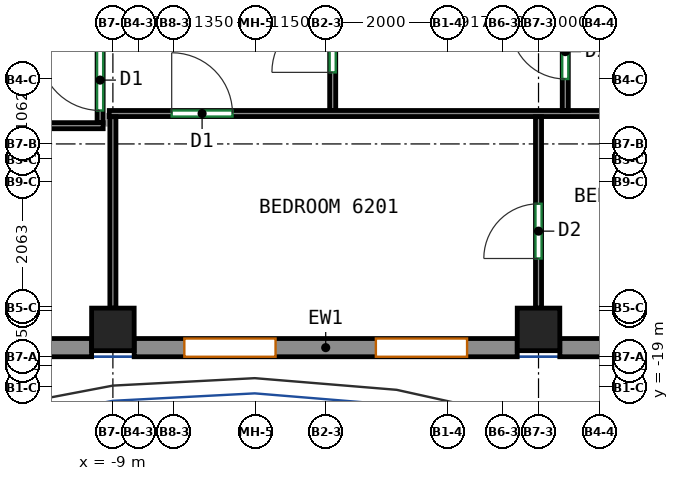
"""IFC4 building model, lengths in metres.
Left out: names, types, materials, properties, quantities, classifications, styles, units other than length and angle.
Written with IfcOpenShell. Run it as: python <this file> out.ifc"""

import sys

from ifc_helpers import new_model, si_unit, direction, frame, frame_2d, origin, origin_2d, place, context, subcontext, project, spatial, rectangle, extrude, source, transform, mapped, element, fill, save


model = new_model("IFC4")
c1 = context("Model", 3, precision=1e-05, world=origin(), true_north=direction((0.0, 1.0)))
c2 = subcontext(c1, "Body", "Model", "MODEL_VIEW")
j1 = project(units=[si_unit("LENGTHUNIT", "METRE"), si_unit("PLANEANGLEUNIT", "RADIAN")], contexts=[c1])
p1 = place(None, origin())
s1 = spatial("IfcSite", under=j1, at=p1, CompositionType="ELEMENT")
p2 = place(p1, origin())
s2 = spatial("IfcBuilding", under=s1, at=p2, CompositionType="ELEMENT")
p3 = place(p2, frame((0.0, 0.0, 256.0)))
s3 = spatial("IfcBuildingStorey", under=s2, at=p3, CompositionType="ELEMENT", Elevation=256.0)
m1 = source(origin(), c2, "Body", "SweptSolid", [
    extrude(rectangle(XDim=0.7, YDim=0.7, at=origin_2d()), origin(), (0.0, 0.0, 1.0), 3.12),
])
for number, where, z_axis, x_axis in (
    (1, (-9.0, -18.05, 0.0), (0.0, 0.0, 1.0), (1.0, 0.0, 0.0)),
    (2, (-2.0, -18.05, 0.0), (0.0, 0.0, 1.0), (1.0, 0.0, 0.0)),
):
    element("IfcColumn", number, at=place(p3, frame(where, z_axis=z_axis, x_axis=x_axis)), inside=s3, PredefinedType="COLUMN", context=c2, shape_type="MappedRepresentation", body=[
        mapped(m1, transform((0.0, 0.0, 0.0))),
    ])
m2 = source(origin(), c2, "Body", "SweptSolid", [
    extrude(rectangle(XDim=6.3, YDim=0.3, at=frame_2d((3.15, 0.0))), origin(), (0.0, 0.0, 1.0), 3.12),
])
p4 = place(p3, frame((-15.65, -18.35, 0.0), z_axis=(0.0, 0.0, 1.0), x_axis=(1.0, 0.0, 0.0)))
e3 = element("IfcWall", 3, at=p4, inside=s3, PredefinedType="SOLIDWALL", context=c2, shape_type="MappedRepresentation", body=[
    mapped(m2, transform((0.0, 0.0, 0.0))),
])
p5 = place(p4, frame((0.825, 0.0, 0.8)))
e4 = element("IfcOpeningElement", 4, at=p5, cuts=e3, PredefinedType="OPENING", context=c2, shape_type="SweptSolid", body=[
    extrude(rectangle(XDim=1.5, YDim=2.05, at=frame_2d((0.75, 1.025))), frame((0.0, 0.16, 0.0), z_axis=(0.0, -1.0, 0.0), x_axis=(1.0, 0.0, 0.0)), (0.0, 0.0, 1.0), 0.32),
])
p6 = place(p4, frame((3.975, 0.0, 0.8)))
e5 = element("IfcOpeningElement", 5, at=p6, cuts=e3, PredefinedType="OPENING", context=c2, shape_type="SweptSolid", body=[
    extrude(rectangle(XDim=1.5, YDim=2.05, at=frame_2d((0.75, 1.025))), frame((0.0, 0.16, 0.0), z_axis=(0.0, -1.0, 0.0), x_axis=(1.0, 0.0, 0.0)), (0.0, 0.0, 1.0), 0.32),
])
p7 = place(p3, frame((-8.65, -18.35, 0.0), z_axis=(0.0, 0.0, 1.0), x_axis=(1.0, 0.0, 0.0)))
e6 = element("IfcWall", 6, at=p7, inside=s3, PredefinedType="SOLIDWALL", context=c2, shape_type="MappedRepresentation", body=[
    mapped(m2, transform((0.0, 0.0, 0.0))),
])
p8 = place(p7, frame((0.825, 0.0, 0.8)))
e7 = element("IfcOpeningElement", 7, at=p8, cuts=e6, PredefinedType="OPENING", context=c2, shape_type="SweptSolid", body=[
    extrude(rectangle(XDim=1.5, YDim=2.05, at=frame_2d((0.75, 1.025))), frame((0.0, 0.16, 0.0), z_axis=(0.0, -1.0, 0.0), x_axis=(1.0, 0.0, 0.0)), (0.0, 0.0, 1.0), 0.32),
])
p9 = place(p7, frame((3.975, 0.0, 0.8)))
e8 = element("IfcOpeningElement", 8, at=p9, cuts=e6, PredefinedType="OPENING", context=c2, shape_type="SweptSolid", body=[
    extrude(rectangle(XDim=1.5, YDim=2.05, at=frame_2d((0.75, 1.025))), frame((0.0, 0.16, 0.0), z_axis=(0.0, -1.0, 0.0), x_axis=(1.0, 0.0, 0.0)), (0.0, 0.0, 1.0), 0.32),
])
p10 = place(p3, frame((-1.65, -18.35, 0.0), z_axis=(0.0, 0.0, 1.0), x_axis=(1.0, 0.0, 0.0)))
e9 = element("IfcWall", 9, at=p10, inside=s3, PredefinedType="SOLIDWALL", context=c2, shape_type="MappedRepresentation", body=[
    mapped(m2, transform((0.0, 0.0, 0.0))),
])
p11 = place(p10, frame((0.825, 0.0, 0.8)))
e10 = element("IfcOpeningElement", 10, at=p11, cuts=e9, PredefinedType="OPENING", context=c2, shape_type="SweptSolid", body=[
    extrude(rectangle(XDim=1.5, YDim=2.05, at=frame_2d((0.75, 1.025))), frame((0.0, 0.16, 0.0), z_axis=(0.0, -1.0, 0.0), x_axis=(1.0, 0.0, 0.0)), (0.0, 0.0, 1.0), 0.32),
])
p12 = place(p10, frame((3.975, 0.0, 0.8)))
e11 = element("IfcOpeningElement", 11, at=p12, cuts=e9, PredefinedType="OPENING", context=c2, shape_type="SweptSolid", body=[
    extrude(rectangle(XDim=1.5, YDim=2.05, at=frame_2d((0.75, 1.025))), frame((0.0, 0.16, 0.0), z_axis=(0.0, -1.0, 0.0), x_axis=(1.0, 0.0, 0.0)), (0.0, 0.0, 1.0), 0.32),
])
p13 = place(p3, frame((-9.21, -14.65, 0.0), z_axis=(0.0, 0.0, 1.0), x_axis=(0.0, 1.0, 0.0)))
e12 = element("IfcWall", 12, at=p13, inside=s3, PredefinedType="PARTITIONING", context=c2, shape_type="SweptSolid", body=[
    extrude(rectangle(XDim=2.773, YDim=0.1, at=frame_2d((1.386, 0.0))), origin(), (0.0, 0.0, 1.0), 3.12),
])
p14 = place(p13, frame((0.2, 0.0, 0.0)))
e13 = element("IfcOpeningElement", 13, at=p14, cuts=e12, PredefinedType="OPENING", context=c2, shape_type="SweptSolid", body=[
    extrude(rectangle(XDim=1.0, YDim=2.1, at=frame_2d((0.5, 1.05))), frame((0.0, 0.06, 0.0), z_axis=(0.0, -1.0, 0.0), x_axis=(1.0, 0.0, 0.0)), (0.0, 0.0, 1.0), 0.12),
])
p15 = place(p3, frame((-13.55, -14.7, 0.0), z_axis=(0.0, 0.0, 1.0), x_axis=(1.0, 0.0, 0.0)))
e14 = element("IfcWall", 14, at=p15, inside=s3, PredefinedType="PARTITIONING", context=c2, shape_type="SweptSolid", body=[
    extrude(rectangle(XDim=4.39, YDim=0.1, at=frame_2d((2.195, 0.0))), origin(), (0.0, 0.0, 1.0), 3.12),
])
p16 = place(p15, frame((0.715, 0.0, 0.0)))
e15 = element("IfcOpeningElement", 15, at=p16, cuts=e14, PredefinedType="OPENING", context=c2, shape_type="SweptSolid", body=[
    extrude(rectangle(XDim=0.9, YDim=2.1, at=frame_2d((0.45, 1.05))), frame((0.0, 0.06, 0.0), z_axis=(0.0, -1.0, 0.0), x_axis=(1.0, 0.0, 0.0)), (0.0, 0.0, 1.0), 0.12),
])
p17 = place(p3, frame((-5.385, -14.45, 0.0), z_axis=(0.0, 0.0, 1.0), x_axis=(0.0, 1.0, 0.0)))
e16 = element("IfcWall", 16, at=p17, inside=s3, PredefinedType="PARTITIONING", context=c2, shape_type="SweptSolid", body=[
    extrude(rectangle(XDim=2.573, YDim=0.1, at=frame_2d((1.287, 0.0))), origin(), (0.0, 0.0, 1.0), 3.12),
])
p18 = place(p17, frame((0.627, 0.0, 0.0)))
e17 = element("IfcOpeningElement", 17, at=p18, cuts=e16, PredefinedType="OPENING", context=c2, shape_type="SweptSolid", body=[
    extrude(rectangle(XDim=1.0, YDim=2.1, at=frame_2d((0.5, 1.05))), frame((0.0, 0.06, 0.0), z_axis=(0.0, -1.0, 0.0), x_axis=(1.0, 0.0, 0.0)), (0.0, 0.0, 1.0), 0.12),
])
p19 = place(p3, frame((-9.06, -14.5, 0.0), z_axis=(0.0, 0.0, 1.0), x_axis=(1.0, 0.0, 0.0)))
e18 = element("IfcWall", 18, at=p19, inside=s3, PredefinedType="PARTITIONING", context=c2, shape_type="SweptSolid", body=[
    extrude(rectangle(XDim=24.66, YDim=0.1, at=frame_2d((12.33, 0.0))), origin(), (0.0, 0.0, 1.0), 3.12),
])
p20 = place(p19, frame((1.027, 0.0, 0.0)))
e19 = element("IfcOpeningElement", 19, at=p20, cuts=e18, PredefinedType="OPENING", context=c2, shape_type="SweptSolid", body=[
    extrude(rectangle(XDim=1.0, YDim=2.1, at=frame_2d((0.5, 1.05))), frame((0.0, 0.06, 0.0), z_axis=(0.0, -1.0, 0.0), x_axis=(1.0, 0.0, 0.0)), (0.0, 0.0, 1.0), 0.12),
])
p21 = place(p19, frame((15.732, 0.0, 0.0)))
e20 = element("IfcOpeningElement", 20, at=p21, cuts=e18, PredefinedType="OPENING", context=c2, shape_type="SweptSolid", body=[
    extrude(rectangle(XDim=1.0, YDim=2.1, at=frame_2d((0.5, 1.05))), frame((0.0, 0.06, 0.0), z_axis=(0.0, -1.0, 0.0), x_axis=(1.0, 0.0, 0.0)), (0.0, 0.0, 1.0), 0.12),
])
p22 = place(p19, frame((18.494, 0.0, 0.0)))
e21 = element("IfcOpeningElement", 21, at=p22, cuts=e18, PredefinedType="OPENING", context=c2, shape_type="SweptSolid", body=[
    extrude(rectangle(XDim=1.0, YDim=2.1, at=frame_2d((0.5, 1.05))), frame((0.0, 0.06, 0.0), z_axis=(0.0, -1.0, 0.0), x_axis=(1.0, 0.0, 0.0)), (0.0, 0.0, 1.0), 0.12),
])
p23 = place(p3, frame((-1.56, -14.45, 0.0), z_axis=(0.0, 0.0, 1.0), x_axis=(0.0, 1.0, 0.0)))
e22 = element("IfcWall", 22, at=p23, inside=s3, PredefinedType="PARTITIONING", context=c2, shape_type="SweptSolid", body=[
    extrude(rectangle(XDim=2.573, YDim=0.1, at=frame_2d((1.287, 0.0))), origin(), (0.0, 0.0, 1.0), 3.12),
])
p24 = place(p23, frame((0.518, 0.0, 0.0)))
e23 = element("IfcOpeningElement", 23, at=p24, cuts=e22, PredefinedType="OPENING", context=c2, shape_type="SweptSolid", body=[
    extrude(rectangle(XDim=0.9, YDim=2.1, at=frame_2d((0.45, 1.05))), frame((0.0, 0.06, 0.0), z_axis=(0.0, -1.0, 0.0), x_axis=(1.0, 0.0, 0.0)), (0.0, 0.0, 1.0), 0.12),
])
p25 = place(p3, frame((-9.0, -17.7, 0.0), z_axis=(0.0, 0.0, 1.0), x_axis=(0.0, 1.0, 0.0)))
e24 = element("IfcWall", 24, at=p25, inside=s3, PredefinedType="PARTITIONING", context=c2, shape_type="SweptSolid", body=[
    extrude(rectangle(XDim=3.148, YDim=0.1, at=frame_2d((1.574, 0.0))), origin(), (0.0, 0.0, 1.0), 3.12),
])
p26 = place(p3, frame((-2.0, -17.7, 0.0), z_axis=(0.0, 0.0, 1.0), x_axis=(0.0, 1.0, 0.0)))
e25 = element("IfcWall", 25, at=p26, inside=s3, PredefinedType="PARTITIONING", context=c2, shape_type="SweptSolid", body=[
    extrude(rectangle(XDim=3.148, YDim=0.1, at=frame_2d((1.574, 0.0))), origin(), (0.0, 0.0, 1.0), 3.12),
])
p27 = place(p26, frame((0.816, 0.0, 0.0)))
e26 = element("IfcOpeningElement", 26, at=p27, cuts=e25, PredefinedType="OPENING", context=c2, shape_type="SweptSolid", body=[
    extrude(rectangle(XDim=0.9, YDim=2.1, at=frame_2d((0.45, 1.05))), frame((0.0, 0.06, 0.0), z_axis=(0.0, -1.0, 0.0), x_axis=(1.0, 0.0, 0.0)), (0.0, 0.0, 1.0), 0.12),
])
p28 = place(p8, origin())
e27 = element("IfcWindow", 27, at=p28, inside=s3, PartitioningType="SINGLE_PANEL", PredefinedType="WINDOW", context=c2, shape_type="SweptSolid", body=[
    extrude(rectangle(XDim=1.5, YDim=2.05, at=frame_2d((0.75, 1.025))), frame((0.0, 0.03, 0.0), z_axis=(0.0, -1.0, 0.0), x_axis=(1.0, 0.0, 0.0)), (0.0, 0.0, 1.0), 0.06),
])
fill(e7, e27)
p29 = place(p9, origin())
e28 = element("IfcWindow", 28, at=p29, inside=s3, PartitioningType="SINGLE_PANEL", PredefinedType="WINDOW", context=c2, shape_type="SweptSolid", body=[
    extrude(rectangle(XDim=1.5, YDim=2.05, at=frame_2d((0.75, 1.025))), frame((0.0, 0.03, 0.0), z_axis=(0.0, -1.0, 0.0), x_axis=(1.0, 0.0, 0.0)), (0.0, 0.0, 1.0), 0.06),
])
fill(e8, e28)
p30 = place(p27, origin())
e29 = element("IfcDoor", 29, at=p30, inside=s3, OperationType="SINGLE_SWING_LEFT", PredefinedType="DOOR", context=c2, shape_type="SweptSolid", body=[
    extrude(rectangle(XDim=0.9, YDim=2.1, at=frame_2d((0.45, 1.05))), frame((0.0, 0.025, 0.0), z_axis=(0.0, -1.0, 0.0), x_axis=(1.0, 0.0, 0.0)), (0.0, 0.0, 1.0), 0.05),
])
fill(e26, e29)
p31 = place(p20, origin())
e30 = element("IfcDoor", 30, at=p31, inside=s3, OperationType="SINGLE_SWING_LEFT", PredefinedType="DOOR", context=c2, shape_type="SweptSolid", body=[
    extrude(rectangle(XDim=1.0, YDim=2.1, at=frame_2d((0.5, 1.05))), frame((0.0, 0.025, 0.0), z_axis=(0.0, -1.0, 0.0), x_axis=(1.0, 0.0, 0.0)), (0.0, 0.0, 1.0), 0.05),
])
fill(e19, e30)
p32 = place(p14, origin())
e31 = element("IfcDoor", 31, at=p32, inside=s3, OperationType="SINGLE_SWING_RIGHT", PredefinedType="DOOR", context=c2, shape_type="SweptSolid", body=[
    extrude(rectangle(XDim=1.0, YDim=2.1, at=frame_2d((0.5, 1.05))), frame((0.0, 0.025, 0.0), z_axis=(0.0, -1.0, 0.0), x_axis=(1.0, 0.0, 0.0)), (0.0, 0.0, 1.0), 0.05),
])
fill(e13, e31)
p33 = place(p24, origin())
e32 = element("IfcDoor", 32, at=p33, inside=s3, OperationType="SINGLE_SWING_RIGHT", PredefinedType="DOOR", context=c2, shape_type="SweptSolid", body=[
    extrude(rectangle(XDim=0.9, YDim=2.1, at=frame_2d((0.45, 1.05))), frame((0.0, 0.025, 0.0), z_axis=(0.0, -1.0, 0.0), x_axis=(1.0, 0.0, 0.0)), (0.0, 0.0, 1.0), 0.05),
])
fill(e23, e32)
p34 = place(p18, origin())
e33 = element("IfcDoor", 33, at=p34, inside=s3, OperationType="SINGLE_SWING_LEFT", PredefinedType="DOOR", context=c2, shape_type="SweptSolid", body=[
    extrude(rectangle(XDim=1.0, YDim=2.1, at=frame_2d((0.5, 1.05))), frame((0.0, 0.025, 0.0), z_axis=(0.0, -1.0, 0.0), x_axis=(1.0, 0.0, 0.0)), (0.0, 0.0, 1.0), 0.05),
])
fill(e17, e33)
save(model, sys.argv[1])
